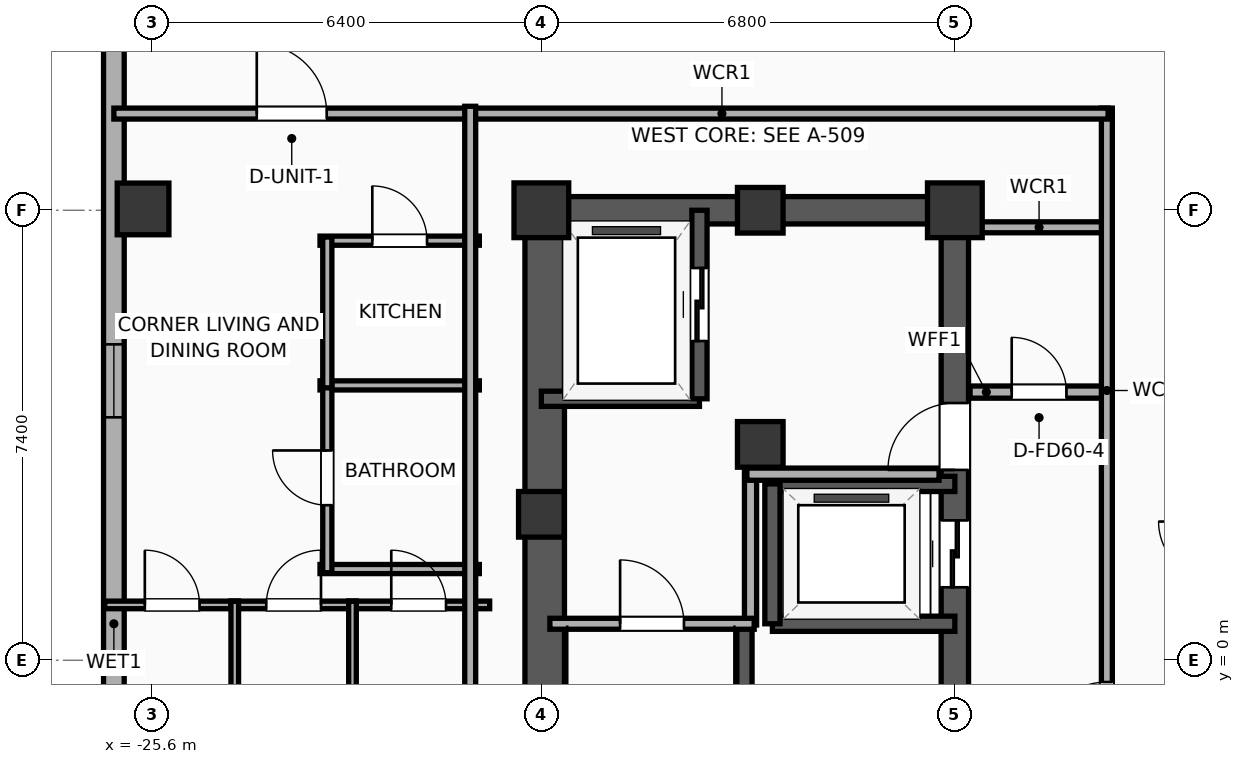
"""IFC4 building model, lengths in metres.
Left out: names, types, materials, properties, quantities, classifications, styles, units other than length and angle.
Written with IfcOpenShell. Run it as: python <this file> out.ifc"""

import sys

from ifc_helpers import new_model, si_unit, direction, frame, frame_2d, origin, origin_2d, place, context, subcontext, project, spatial, rectangle, hollow_rectangle, extrude, element, fill, save


model = new_model("IFC4")
c1 = context("Model", 3, precision=1e-05, world=origin(), true_north=direction((0.0, 1.0)))
c2 = subcontext(c1, "Body", "Model", "MODEL_VIEW")
j1 = project(units=[si_unit("LENGTHUNIT", "METRE"), si_unit("PLANEANGLEUNIT", "RADIAN")], contexts=[c1])
p1 = place(None, origin())
s1 = spatial("IfcSite", under=j1, at=p1, CompositionType="ELEMENT")
p2 = place(p1, origin())
s2 = spatial("IfcBuilding", under=s1, at=p2, CompositionType="ELEMENT")
p3 = place(p2, frame((0.0, 0.0, 247.0)))
s3 = spatial("IfcBuildingStorey", under=s2, at=p3, CompositionType="ELEMENT", Elevation=247.0)
p4 = place(p3, frame((-19.2, 2.4, 0.0), z_axis=(0.0, 0.0, 1.0), x_axis=(1.0, 0.0, 0.0)))
e1 = element("IfcColumn", 1, at=p4, inside=s3, PredefinedType="COLUMN", context=c2, shape_type="SweptSolid", body=[
    extrude(rectangle(XDim=0.75, YDim=0.75, at=origin_2d()), origin(), (0.0, 0.0, 1.0), 3.9),
])
p5 = place(p3, frame((-19.2, 7.4, 0.0), z_axis=(0.0, 0.0, 1.0), x_axis=(1.0, 0.0, 0.0)))
e2 = element("IfcColumn", 2, at=p5, inside=s3, PredefinedType="COLUMN", context=c2, shape_type="SweptSolid", body=[
    extrude(rectangle(XDim=0.9, YDim=0.9, at=origin_2d()), origin(), (0.0, 0.0, 1.0), 3.9),
])
for number, where, z_axis, x_axis in (
    (3, (-15.6, 7.4, 0.0), (0.0, 0.0, 1.0), (1.0, 0.0, 0.0)),
    (4, (-15.6, 3.55, 0.0), (0.0, 0.0, 1.0), (1.0, 0.0, 0.0)),
):
    element("IfcColumn", number, at=place(p3, frame(where, z_axis=z_axis, x_axis=x_axis)), inside=s3, PredefinedType="COLUMN", context=c2, shape_type="SweptSolid", body=[
        extrude(rectangle(XDim=0.75, YDim=0.75, at=origin_2d()), origin(), (0.0, 0.0, 1.0), 3.9),
    ])
p6 = place(p3, frame((-12.4, 7.4, 0.0), z_axis=(0.0, 0.0, 1.0), x_axis=(1.0, 0.0, 0.0)))
e5 = element("IfcColumn", 5, at=p6, inside=s3, PredefinedType="COLUMN", context=c2, shape_type="SweptSolid", body=[
    extrude(rectangle(XDim=0.9, YDim=0.9, at=origin_2d()), origin(), (0.0, 0.0, 1.0), 3.9),
])
p7 = place(p3, frame((-19.425, 7.4, 0.0), z_axis=(0.0, 0.0, 1.0), x_axis=(1.0, 0.0, 0.0)))
e6 = element("IfcWall", 6, at=p7, inside=s3, PredefinedType="SHEAR", context=c2, shape_type="SweptSolid", body=[
    extrude(rectangle(XDim=7.25, YDim=0.45, at=frame_2d((3.625, 0.0))), origin(), (0.0, 0.0, 1.0), 3.65),
])
p8 = place(p3, frame((-19.145, -7.4, 0.0), z_axis=(0.0, 0.0, 1.0), x_axis=(0.0, 1.0, 0.0)))
e7 = element("IfcWall", 7, at=p8, inside=s3, PredefinedType="SHEAR", context=c2, shape_type="SweptSolid", body=[
    extrude(rectangle(XDim=14.8, YDim=0.65, at=frame_2d((7.4, 0.0))), origin(), (0.0, 0.0, 1.0), 3.65),
])
p9 = place(p3, frame((-12.4, -7.4, 0.0), z_axis=(0.0, 0.0, 1.0), x_axis=(0.0, 1.0, 0.0)))
e8 = element("IfcWall", 8, at=p9, inside=s3, PredefinedType="SHEAR", context=c2, shape_type="SweptSolid", body=[
    extrude(rectangle(XDim=14.8, YDim=0.45, at=frame_2d((7.4, 0.0))), origin(), (0.0, 0.0, 1.0), 3.65),
])
p10 = place(p9, frame((8.6, 0.0, 0.0)))
e9 = element("IfcOpeningElement", 9, at=p10, cuts=e8, PredefinedType="OPENING", context=c2, shape_type="SweptSolid", body=[
    extrude(rectangle(XDim=1.1, YDim=2.05, at=frame_2d((0.55, 1.025))), frame((0.0, 0.235, 0.0), z_axis=(0.0, -1.0, 0.0), x_axis=(1.0, 0.0, 0.0)), (0.0, 0.0, 1.0), 0.47),
])
p11 = place(p9, frame((10.53, 0.0, 0.0)))
e10 = element("IfcOpeningElement", 10, at=p11, cuts=e8, PredefinedType="OPENING", context=c2, shape_type="SweptSolid", body=[
    extrude(rectangle(XDim=1.1, YDim=2.05, at=frame_2d((0.55, 1.025))), frame((0.0, 0.235, 0.0), z_axis=(0.0, -1.0, 0.0), x_axis=(1.0, 0.0, 0.0)), (0.0, 0.0, 1.0), 0.47),
])
p12 = place(p9, frame((3.55, 0.0, 0.0)))
e11 = element("IfcOpeningElement", 11, at=p12, cuts=e8, PredefinedType="OPENING", context=c2, shape_type="SweptSolid", body=[
    extrude(rectangle(XDim=0.9, YDim=2.05, at=frame_2d((0.45, 1.025))), frame((0.0, 0.235, 0.0), z_axis=(0.0, -1.0, 0.0), x_axis=(1.0, 0.0, 0.0)), (0.0, 0.0, 1.0), 0.47),
])
p13 = place(p3, frame((-15.86, -7.085, 0.0), z_axis=(0.0, 0.0, 1.0), x_axis=(0.0, 1.0, 0.0)))
e12 = element("IfcWall", 12, at=p13, inside=s3, PredefinedType="SOLIDWALL", context=c2, shape_type="SweptSolid", body=[
    extrude(rectangle(XDim=7.685, YDim=0.25, at=frame_2d((3.843, 0.0))), origin(), (0.0, 0.0, 1.0), 3.65),
])
p14 = place(p3, frame((-25.75, 7.422, 0.0), z_axis=(0.0, 0.0, 1.0), x_axis=(1.0, 0.0, 0.0)))
e13 = element("IfcColumn", 13, at=p14, inside=s3, PredefinedType="COLUMN", context=c2, shape_type="SweptSolid", body=[
    extrude(hollow_rectangle(XDim=0.85, YDim=0.85, WallThickness=0.028, at=origin_2d()), origin(), (0.0, 0.0, 1.0), 3.9),
])
p15 = place(p3, frame((-26.23, -15.383, 0.0), z_axis=(0.0, 0.0, 1.0), x_axis=(0.0, 1.0, 0.0)))
e14 = element("IfcWall", 14, at=p15, inside=s3, PredefinedType="ELEMENTEDWALL", context=c2, shape_type="SweptSolid", body=[
    extrude(rectangle(XDim=31.967, YDim=0.34, at=frame_2d((15.983, 0.0))), origin(), (0.0, 0.0, 1.0), 3.65),
])
p16 = place(p15, frame((29.21, 0.0, 0.75)))
e15 = element("IfcOpeningElement", 15, at=p16, cuts=e14, PredefinedType="OPENING", context=c2, shape_type="SweptSolid", body=[
    extrude(rectangle(XDim=1.2, YDim=2.05, at=frame_2d((0.6, 1.025))), frame((0.0, 0.18, 0.0), z_axis=(0.0, -1.0, 0.0), x_axis=(1.0, 0.0, 0.0)), (0.0, 0.0, 1.0), 0.36),
])
p17 = place(p15, frame((19.378, 0.0, 0.75)))
e16 = element("IfcOpeningElement", 16, at=p17, cuts=e14, PredefinedType="OPENING", context=c2, shape_type="SweptSolid", body=[
    extrude(rectangle(XDim=1.2, YDim=2.05, at=frame_2d((0.6, 1.025))), frame((0.0, 0.18, 0.0), z_axis=(0.0, -1.0, 0.0), x_axis=(1.0, 0.0, 0.0)), (0.0, 0.0, 1.0), 0.36),
])
p18 = place(p15, frame((10.328, 0.0, 0.75)))
e17 = element("IfcOpeningElement", 17, at=p18, cuts=e14, PredefinedType="OPENING", context=c2, shape_type="SweptSolid", body=[
    extrude(rectangle(XDim=1.2, YDim=2.05, at=frame_2d((0.6, 1.025))), frame((0.0, 0.18, 0.0), z_axis=(0.0, -1.0, 0.0), x_axis=(1.0, 0.0, 0.0)), (0.0, 0.0, 1.0), 0.36),
])
p19 = place(p3, frame((-19.2, 4.3, 0.0), z_axis=(0.0, 0.0, 1.0), x_axis=(1.0, 0.0, 0.0)))
e18 = element("IfcWall", 18, at=p19, inside=s3, PredefinedType="SOLIDWALL", context=c2, shape_type="SweptSolid", body=[
    extrude(rectangle(XDim=2.6, YDim=0.25, at=frame_2d((1.3, 0.0))), origin(), (0.0, 0.0, 1.0), 3.65),
])
p20 = place(p3, frame((-16.6, 4.3, 0.0), z_axis=(0.0, 0.0, 1.0), x_axis=(0.0, 1.0, 0.0)))
e19 = element("IfcWall", 19, at=p20, inside=s3, PredefinedType="SOLIDWALL", context=c2, shape_type="SweptSolid", body=[
    extrude(rectangle(XDim=3.1, YDim=0.25, at=frame_2d((1.55, 0.0))), origin(), (0.0, 0.0, 1.0), 3.65),
])
p21 = place(p20, frame((0.95, 0.0, 0.0)))
e20 = element("IfcOpeningElement", 20, at=p21, cuts=e19, PredefinedType="OPENING", context=c2, shape_type="SweptSolid", body=[
    extrude(rectangle(XDim=1.2, YDim=2.05, at=frame_2d((0.6, 1.025))), frame((0.0, 0.135, 0.0), z_axis=(0.0, -1.0, 0.0), x_axis=(1.0, 0.0, 0.0)), (0.0, 0.0, 1.0), 0.27),
])
for number, where, z_axis, x_axis in (
    (21, (-15.4, 0.6, 0.0), (0.0, 0.0, 1.0), (1.0, 0.0, 0.0)),
    (22, (-12.4, 2.9, 0.0), (0.0, 0.0, 1.0), (-1.0, 0.0, 0.0)),
):
    element("IfcWall", number, at=place(p3, frame(where, z_axis=z_axis, x_axis=x_axis)), inside=s3, PredefinedType="SOLIDWALL", context=c2, shape_type="SweptSolid", body=[
        extrude(rectangle(XDim=3.0, YDim=0.25, at=frame_2d((1.5, 0.0))), origin(), (0.0, 0.0, 1.0), 3.65),
    ])
p22 = place(p3, frame((-15.4, 2.9, 0.0), z_axis=(0.0, 0.0, 1.0), x_axis=(0.0, -1.0, 0.0)))
e23 = element("IfcWall", 23, at=p22, inside=s3, PredefinedType="SOLIDWALL", context=c2, shape_type="SweptSolid", body=[
    extrude(rectangle(XDim=2.3, YDim=0.25, at=frame_2d((1.15, 0.0))), origin(), (0.0, 0.0, 1.0), 3.65),
])
p23 = place(p3, frame((-15.76, 0.58, 0.0), z_axis=(0.0, 0.0, 1.0), x_axis=(0.0, 1.0, 0.0)))
e24 = element("IfcWall", 24, at=p23, inside=s3, PredefinedType="PARTITIONING", context=c2, shape_type="SweptSolid", body=[
    extrude(rectangle(XDim=2.52, YDim=0.2, at=frame_2d((1.26, 0.0))), origin(), (0.0, 0.0, 1.0), 3.65),
])
p24 = place(p3, frame((-15.82, 3.06, 0.0), z_axis=(0.0, 0.0, 1.0), x_axis=(1.0, 0.0, 0.0)))
e25 = element("IfcWall", 25, at=p24, inside=s3, PredefinedType="PARTITIONING", context=c2, shape_type="SweptSolid", body=[
    extrude(rectangle(XDim=3.16, YDim=0.2, at=frame_2d((1.58, 0.0))), origin(), (0.0, 0.0, 1.0), 3.65),
])
p25 = place(p3, frame((-19.06, 0.6, 0.0), z_axis=(0.0, 0.0, 1.0), x_axis=(1.0, 0.0, 0.0)))
e26 = element("IfcWall", 26, at=p25, inside=s3, PredefinedType="PARTITIONING", context=c2, shape_type="SweptSolid", body=[
    extrude(rectangle(XDim=3.36, YDim=0.18, at=frame_2d((1.68, 0.0))), origin(), (0.0, 0.0, 1.0), 3.65),
])
p26 = place(p25, frame((1.155, 0.0, 0.0)))
e27 = element("IfcOpeningElement", 27, at=p26, cuts=e26, PredefinedType="OPENING", context=c2, shape_type="SweptSolid", body=[
    extrude(rectangle(XDim=1.05, YDim=2.05, at=frame_2d((0.525, 1.025))), frame((0.0, 0.1, 0.0), z_axis=(0.0, -1.0, 0.0), x_axis=(1.0, 0.0, 0.0)), (0.0, 0.0, 1.0), 0.2),
])
p27 = place(p3, frame((-12.15, 4.41, 0.0), z_axis=(0.0, 0.0, 1.0), x_axis=(1.0, 0.0, 0.0)))
e28 = element("IfcWall", 28, at=p27, inside=s3, PredefinedType="PARTITIONING", context=c2, shape_type="SweptSolid", body=[
    extrude(rectangle(XDim=2.27, YDim=0.2, at=frame_2d((1.135, 0.0))), origin(), (0.0, 0.0, 1.0), 3.65),
])
p28 = place(p27, frame((0.685, 0.0, 0.0)))
e29 = element("IfcOpeningElement", 29, at=p28, cuts=e28, PredefinedType="OPENING", context=c2, shape_type="SweptSolid", body=[
    extrude(rectangle(XDim=0.9, YDim=2.05, at=frame_2d((0.45, 1.025))), frame((0.0, 0.11, 0.0), z_axis=(0.0, -1.0, 0.0), x_axis=(1.0, 0.0, 0.0)), (0.0, 0.0, 1.0), 0.22),
])
p29 = place(p3, frame((-12.15, 7.12, 0.0), z_axis=(0.0, 0.0, 1.0), x_axis=(1.0, 0.0, 0.0)))
e30 = element("IfcWall", 30, at=p29, inside=s3, PredefinedType="PARTITIONING", context=c2, shape_type="SweptSolid", body=[
    extrude(rectangle(XDim=2.27, YDim=0.18, at=frame_2d((1.135, 0.0))), origin(), (0.0, 0.0, 1.0), 3.65),
])
p30 = place(p3, frame((-9.9, -9.08, 0.0), z_axis=(0.0, 0.0, 1.0), x_axis=(0.0, 1.0, 0.0)))
e31 = element("IfcWall", 31, at=p30, inside=s3, PredefinedType="PARTITIONING", context=c2, shape_type="SweptSolid", body=[
    extrude(rectangle(XDim=18.16, YDim=0.18, at=frame_2d((9.08, 0.0))), origin(), (0.0, 0.0, 1.0), 3.65),
])
p31 = place(p30, frame((7.622, 0.0, 0.0)))
e32 = element("IfcOpeningElement", 32, at=p31, cuts=e31, PredefinedType="OPENING", context=c2, shape_type="SweptSolid", body=[
    extrude(rectangle(XDim=1.1, YDim=2.05, at=frame_2d((0.55, 1.025))), frame((0.0, 0.1, 0.0), z_axis=(0.0, -1.0, 0.0), x_axis=(1.0, 0.0, 0.0)), (0.0, 0.0, 1.0), 0.2),
])
p32 = place(p3, frame((-26.23, 8.99, 0.0), z_axis=(0.0, 0.0, 1.0), x_axis=(1.0, 0.0, 0.0)))
e33 = element("IfcWall", 33, at=p32, inside=s3, PredefinedType="PARTITIONING", context=c2, shape_type="SweptSolid", body=[
    extrude(rectangle(XDim=16.35, YDim=0.18, at=frame_2d((8.175, 0.0))), origin(), (0.0, 0.0, 1.0), 3.65),
])
p33 = place(p32, frame((2.35, 0.0, 0.0)))
e34 = element("IfcOpeningElement", 34, at=p33, cuts=e33, PredefinedType="OPENING", context=c2, shape_type="SweptSolid", body=[
    extrude(rectangle(XDim=1.15, YDim=2.05, at=frame_2d((0.575, 1.025))), frame((0.0, 0.1, 0.0), z_axis=(0.0, -1.0, 0.0), x_axis=(1.0, 0.0, 0.0)), (0.0, 0.0, 1.0), 0.2),
])
p34 = place(p3, frame((-22.84, 6.9, 0.0), z_axis=(0.0, 0.0, 1.0), x_axis=(1.0, 0.0, 0.0)))
e35 = element("IfcWall", 35, at=p34, inside=s3, PredefinedType="PLUMBINGWALL", context=c2, shape_type="SweptSolid", body=[
    extrude(rectangle(XDim=2.62, YDim=0.15, at=frame_2d((1.31, 0.0))), origin(), (0.0, 0.0, 1.0), 3.65),
])
p35 = place(p34, frame((0.86, 0.0, 0.0)))
e36 = element("IfcOpeningElement", 36, at=p35, cuts=e35, PredefinedType="OPENING", context=c2, shape_type="SweptSolid", body=[
    extrude(rectangle(XDim=0.9, YDim=2.05, at=frame_2d((0.45, 1.025))), frame((0.0, 0.085, 0.0), z_axis=(0.0, -1.0, 0.0), x_axis=(1.0, 0.0, 0.0)), (0.0, 0.0, 1.0), 0.17),
])
for number, where, z_axis, x_axis in (
    (37, (-22.84, 4.52, 0.0), (0.0, 0.0, 1.0), (1.0, 0.0, 0.0)),
    (38, (-22.84, 1.5, 0.0), (0.0, 0.0, 1.0), (1.0, 0.0, 0.0)),
):
    element("IfcWall", number, at=place(p3, frame(where, z_axis=z_axis, x_axis=x_axis)), inside=s3, PredefinedType="PLUMBINGWALL", context=c2, shape_type="SweptSolid", body=[
        extrude(rectangle(XDim=2.62, YDim=0.15, at=frame_2d((1.31, 0.0))), origin(), (0.0, 0.0, 1.0), 3.65),
    ])
p36 = place(p3, frame((-22.72, 1.44, 0.0), z_axis=(0.0, 0.0, 1.0), x_axis=(0.0, 1.0, 0.0)))
e39 = element("IfcWall", 39, at=p36, inside=s3, PredefinedType="PLUMBINGWALL", context=c2, shape_type="SweptSolid", body=[
    extrude(rectangle(XDim=3.12, YDim=0.15, at=frame_2d((1.56, 0.0))), origin(), (0.0, 0.0, 1.0), 3.65),
])
p37 = place(p36, frame((1.11, 0.0, 0.0)))
e40 = element("IfcOpeningElement", 40, at=p37, cuts=e39, PredefinedType="OPENING", context=c2, shape_type="SweptSolid", body=[
    extrude(rectangle(XDim=0.9, YDim=2.05, at=frame_2d((0.45, 1.025))), frame((0.0, 0.085, 0.0), z_axis=(0.0, -1.0, 0.0), x_axis=(1.0, 0.0, 0.0)), (0.0, 0.0, 1.0), 0.17),
])
p38 = place(p3, frame((-22.72, 4.48, 0.0), z_axis=(0.0, 0.0, 1.0), x_axis=(0.0, 1.0, 0.0)))
e41 = element("IfcWall", 41, at=p38, inside=s3, PredefinedType="PLUMBINGWALL", context=c2, shape_type="SweptSolid", body=[
    extrude(rectangle(XDim=2.48, YDim=0.15, at=frame_2d((1.24, 0.0))), origin(), (0.0, 0.0, 1.0), 3.65),
])
p39 = place(p3, frame((-26.38, 0.91, 0.0), z_axis=(0.0, 0.0, 1.0), x_axis=(1.0, 0.0, 0.0)))
e42 = element("IfcWall", 42, at=p39, inside=s3, PredefinedType="PARTITIONING", context=c2, shape_type="SweptSolid", body=[
    extrude(rectangle(XDim=2.2, YDim=0.125, at=frame_2d((1.1, 0.0))), origin(), (0.0, 0.0, 1.0), 3.65),
])
p40 = place(p39, frame((0.659, 0.0, 0.0)))
e43 = element("IfcOpeningElement", 43, at=p40, cuts=e42, PredefinedType="OPENING", context=c2, shape_type="SweptSolid", body=[
    extrude(rectangle(XDim=0.9, YDim=2.05, at=frame_2d((0.45, 1.025))), frame((0.0, 0.073, 0.0), z_axis=(0.0, -1.0, 0.0), x_axis=(1.0, 0.0, 0.0)), (0.0, 0.0, 1.0), 0.145),
])
p41 = place(p3, frame((-24.304, 0.91, 0.0), z_axis=(0.0, 0.0, 1.0), x_axis=(1.0, 0.0, 0.0)))
e44 = element("IfcWall", 44, at=p41, inside=s3, PredefinedType="PARTITIONING", context=c2, shape_type="SweptSolid", body=[
    extrude(rectangle(XDim=2.061, YDim=0.125, at=frame_2d((1.031, 0.0))), origin(), (0.0, 0.0, 1.0), 3.65),
])
p42 = place(p41, frame((0.581, 0.0, 0.0)))
e45 = element("IfcOpeningElement", 45, at=p42, cuts=e44, PredefinedType="OPENING", context=c2, shape_type="SweptSolid", body=[
    extrude(rectangle(XDim=0.9, YDim=2.05, at=frame_2d((0.45, 1.025))), frame((0.0, 0.073, 0.0), z_axis=(0.0, -1.0, 0.0), x_axis=(1.0, 0.0, 0.0)), (0.0, 0.0, 1.0), 0.145),
])
p43 = place(p3, frame((-22.368, 0.91, 0.0), z_axis=(0.0, 0.0, 1.0), x_axis=(1.0, 0.0, 0.0)))
e46 = element("IfcWall", 46, at=p43, inside=s3, PredefinedType="PARTITIONING", context=c2, shape_type="SweptSolid", body=[
    extrude(rectangle(XDim=2.318, YDim=0.125, at=frame_2d((1.159, 0.0))), origin(), (0.0, 0.0, 1.0), 3.65),
])
p44 = place(p43, frame((0.7, 0.0, 0.0)))
e47 = element("IfcOpeningElement", 47, at=p44, cuts=e46, PredefinedType="OPENING", context=c2, shape_type="SweptSolid", body=[
    extrude(rectangle(XDim=0.9, YDim=2.05, at=frame_2d((0.45, 1.025))), frame((0.0, 0.073, 0.0), z_axis=(0.0, -1.0, 0.0), x_axis=(1.0, 0.0, 0.0)), (0.0, 0.0, 1.0), 0.145),
])
for number, where, z_axis, x_axis in (
    (48, (-22.306, -9.31, 0.0), (0.0, 0.0, 1.0), (0.0, 1.0, 0.0)),
    (49, (-24.242, -9.31, 0.0), (0.0, 0.0, 1.0), (0.0, 1.0, 0.0)),
):
    element("IfcWall", number, at=place(p3, frame(where, z_axis=z_axis, x_axis=x_axis)), inside=s3, PredefinedType="PARTITIONING", context=c2, shape_type="SweptSolid", body=[
        extrude(rectangle(XDim=10.28, YDim=0.125, at=frame_2d((5.14, 0.0))), origin(), (0.0, 0.0, 1.0), 3.65),
    ])
p45 = place(p3, frame((-20.37, -9.11, 0.0), z_axis=(0.0, 0.0, 1.0), x_axis=(0.0, 1.0, 0.0)))
e50 = element("IfcWall", 50, at=p45, inside=s3, PredefinedType="PARTITIONING", context=c2, shape_type="SweptSolid", body=[
    extrude(rectangle(XDim=18.22, YDim=0.18, at=frame_2d((9.11, 0.0))), origin(), (0.0, 0.0, 1.0), 3.65),
])
p46 = place(p17, origin())
e51 = element("IfcWindow", 51, at=p46, inside=s3, PartitioningType="SINGLE_PANEL", PredefinedType="WINDOW", context=c2, shape_type="SweptSolid", body=[
    extrude(rectangle(XDim=1.2, YDim=2.05, at=frame_2d((0.6, 1.025))), frame((0.0, 0.03, 0.0), z_axis=(0.0, -1.0, 0.0), x_axis=(1.0, 0.0, 0.0)), (0.0, 0.0, 1.0), 0.06),
])
fill(e16, e51)
p47 = place(p21, origin())
e52 = element("IfcDoor", 52, at=p47, inside=s3, OperationType="SLIDING_TO_LEFT", PredefinedType="DOOR", context=c2, shape_type="SweptSolid", body=[
    extrude(rectangle(XDim=1.2, YDim=2.05, at=frame_2d((0.6, 1.025))), frame((0.0, 0.025, 0.0), z_axis=(0.0, -1.0, 0.0), x_axis=(1.0, 0.0, 0.0)), (0.0, 0.0, 1.0), 0.05),
])
fill(e20, e52)
p48 = place(p10, origin())
e53 = element("IfcDoor", 53, at=p48, inside=s3, OperationType="SLIDING_TO_LEFT", PredefinedType="DOOR", context=c2, shape_type="SweptSolid", body=[
    extrude(rectangle(XDim=1.1, YDim=2.05, at=frame_2d((0.55, 1.025))), frame((0.0, 0.025, 0.0), z_axis=(0.0, -1.0, 0.0), x_axis=(1.0, 0.0, 0.0)), (0.0, 0.0, 1.0), 0.05),
])
fill(e9, e53)
p49 = place(p26, origin())
e54 = element("IfcDoor", 54, at=p49, inside=s3, OperationType="SINGLE_SWING_LEFT", PredefinedType="DOOR", context=c2, shape_type="SweptSolid", body=[
    extrude(rectangle(XDim=1.05, YDim=2.05, at=frame_2d((0.525, 1.025))), frame((0.0, 0.025, 0.0), z_axis=(0.0, -1.0, 0.0), x_axis=(1.0, 0.0, 0.0)), (0.0, 0.0, 1.0), 0.05),
])
fill(e27, e54)
p50 = place(p28, origin())
e55 = element("IfcDoor", 55, at=p50, inside=s3, OperationType="SINGLE_SWING_LEFT", PredefinedType="DOOR", context=c2, shape_type="SweptSolid", body=[
    extrude(rectangle(XDim=0.9, YDim=2.05, at=frame_2d((0.45, 1.025))), frame((0.0, 0.025, 0.0), z_axis=(0.0, -1.0, 0.0), x_axis=(1.0, 0.0, 0.0)), (0.0, 0.0, 1.0), 0.05),
])
fill(e29, e55)
p51 = place(p31, origin())
e56 = element("IfcDoor", 56, at=p51, inside=s3, OperationType="SINGLE_SWING_LEFT", PredefinedType="DOOR", context=c2, shape_type="SweptSolid", body=[
    extrude(rectangle(XDim=1.1, YDim=2.05, at=frame_2d((0.55, 1.025))), frame((0.0, 0.025, 0.0), z_axis=(0.0, -1.0, 0.0), x_axis=(1.0, 0.0, 0.0)), (0.0, 0.0, 1.0), 0.05),
])
fill(e32, e56)
p52 = place(p33, origin())
e57 = element("IfcDoor", 57, at=p52, inside=s3, OperationType="SINGLE_SWING_LEFT", PredefinedType="DOOR", context=c2, shape_type="SweptSolid", body=[
    extrude(rectangle(XDim=1.15, YDim=2.05, at=frame_2d((0.575, 1.025))), frame((0.0, 0.025, 0.0), z_axis=(0.0, -1.0, 0.0), x_axis=(1.0, 0.0, 0.0)), (0.0, 0.0, 1.0), 0.05),
])
fill(e34, e57)
p53 = place(p35, origin())
e58 = element("IfcDoor", 58, at=p53, inside=s3, OperationType="SINGLE_SWING_LEFT", PredefinedType="DOOR", context=c2, shape_type="SweptSolid", body=[
    extrude(rectangle(XDim=0.9, YDim=2.05, at=frame_2d((0.45, 1.025))), frame((0.0, 0.025, 0.0), z_axis=(0.0, -1.0, 0.0), x_axis=(1.0, 0.0, 0.0)), (0.0, 0.0, 1.0), 0.05),
])
fill(e36, e58)
p54 = place(p37, origin())
e59 = element("IfcDoor", 59, at=p54, inside=s3, OperationType="SINGLE_SWING_RIGHT", PredefinedType="DOOR", context=c2, shape_type="SweptSolid", body=[
    extrude(rectangle(XDim=0.9, YDim=2.05, at=frame_2d((0.45, 1.025))), frame((0.0, 0.025, 0.0), z_axis=(0.0, -1.0, 0.0), x_axis=(1.0, 0.0, 0.0)), (0.0, 0.0, 1.0), 0.05),
])
fill(e40, e59)
p55 = place(p40, origin())
e60 = element("IfcDoor", 60, at=p55, inside=s3, OperationType="SINGLE_SWING_LEFT", PredefinedType="DOOR", context=c2, shape_type="SweptSolid", body=[
    extrude(rectangle(XDim=0.9, YDim=2.05, at=frame_2d((0.45, 1.025))), frame((0.0, 0.025, 0.0), z_axis=(0.0, -1.0, 0.0), x_axis=(1.0, 0.0, 0.0)), (0.0, 0.0, 1.0), 0.05),
])
fill(e43, e60)
p56 = place(p42, origin())
e61 = element("IfcDoor", 61, at=p56, inside=s3, OperationType="SINGLE_SWING_RIGHT", PredefinedType="DOOR", context=c2, shape_type="SweptSolid", body=[
    extrude(rectangle(XDim=0.9, YDim=2.05, at=frame_2d((0.45, 1.025))), frame((0.0, 0.025, 0.0), z_axis=(0.0, -1.0, 0.0), x_axis=(1.0, 0.0, 0.0)), (0.0, 0.0, 1.0), 0.05),
])
fill(e45, e61)
p57 = place(p44, origin())
e62 = element("IfcDoor", 62, at=p57, inside=s3, OperationType="SINGLE_SWING_LEFT", PredefinedType="DOOR", context=c2, shape_type="SweptSolid", body=[
    extrude(rectangle(XDim=0.9, YDim=2.05, at=frame_2d((0.45, 1.025))), frame((0.0, 0.025, 0.0), z_axis=(0.0, -1.0, 0.0), x_axis=(1.0, 0.0, 0.0)), (0.0, 0.0, 1.0), 0.05),
])
fill(e47, e62)
p58 = place(p11, origin())
e63 = element("IfcDoor", 63, at=p58, inside=s3, OperationType="SINGLE_SWING_LEFT", PredefinedType="DOOR", context=c2, shape_type="SweptSolid", body=[
    extrude(rectangle(XDim=1.1, YDim=2.05, at=frame_2d((0.55, 1.025))), frame((0.0, 0.025, 0.0), z_axis=(0.0, -1.0, 0.0), x_axis=(1.0, 0.0, 0.0)), (0.0, 0.0, 1.0), 0.05),
])
fill(e10, e63)
save(model, sys.argv[1])
